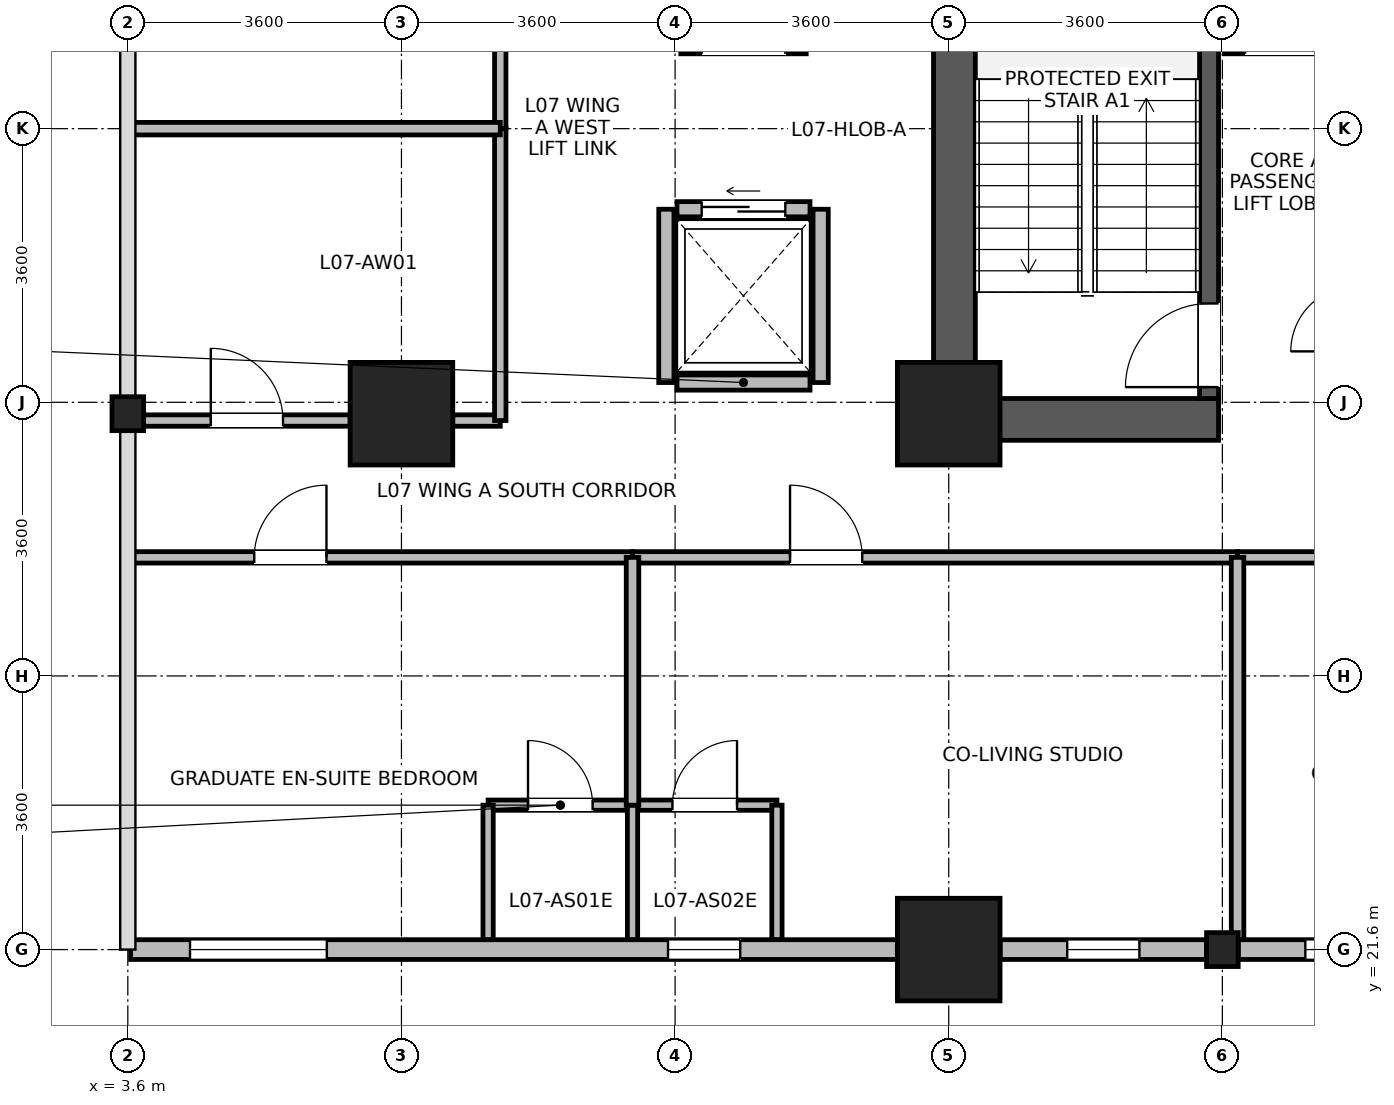
"""IFC4 building model, lengths in metres.
Left out: names, types, materials, properties, quantities, classifications, styles, units other than length and angle.
Written with IfcOpenShell. Run it as: python <this file> out.ifc"""

import sys

from ifc_helpers import new_model, si_unit, direction, frame, frame_2d, origin, origin_2d, place, context, subcontext, project, spatial, rectangle, i_section, extrude, source, transform, mapped, element, fill, save


model = new_model("IFC4")
c1 = context("Model", 3, precision=1e-05, world=origin(), true_north=direction((0.0, 1.0)))
c2 = subcontext(c1, "Body", "Model", "MODEL_VIEW")
j1 = project(units=[si_unit("LENGTHUNIT", "METRE"), si_unit("PLANEANGLEUNIT", "RADIAN")], contexts=[c1])
p1 = place(None, origin())
s1 = spatial("IfcSite", under=j1, at=p1, CompositionType="ELEMENT")
p2 = place(p1, origin())
s2 = spatial("IfcBuilding", under=s1, at=p2, CompositionType="ELEMENT")
p3 = place(p2, frame((0.0, 0.0, 32.7)))
s3 = spatial("IfcBuildingStorey", under=s2, at=p3, CompositionType="ELEMENT", Elevation=32.7)
p4 = place(p3, frame((14.475, 28.3, 0.0), z_axis=(0.0, 0.0, 1.0), x_axis=(0.0, 1.0, 0.0)))
e1 = element("IfcWall", 1, at=p4, inside=s3, PredefinedType="SHEAR", context=c2, shape_type="SweptSolid", body=[
    extrude(rectangle(XDim=8.1, YDim=0.55, at=frame_2d((4.05, 0.0))), origin(), (0.0, 0.0, 1.0), 3.45),
])
p5 = place(p3, frame((14.75, 28.575, 0.0), z_axis=(0.0, 0.0, 1.0), x_axis=(1.0, 0.0, 0.0)))
e2 = element("IfcWall", 2, at=p5, inside=s3, PredefinedType="SHEAR", context=c2, shape_type="SweptSolid", body=[
    extrude(rectangle(XDim=3.2, YDim=0.55, at=frame_2d((1.6, 0.0))), origin(), (0.0, 0.0, 1.0), 3.45),
])
p6 = place(p3, frame((17.825, 28.85, 0.0), z_axis=(0.0, 0.0, 1.0), x_axis=(0.0, 1.0, 0.0)))
e3 = element("IfcWall", 3, at=p6, inside=s3, PredefinedType="SHEAR", context=c2, shape_type="SweptSolid", body=[
    extrude(rectangle(XDim=7.0, YDim=0.25, at=frame_2d((3.5, 0.0))), origin(), (0.0, 0.0, 1.0), 3.45),
])
p7 = place(p6, frame((0.15, 0.0, 0.0)))
e4 = element("IfcOpeningElement", 4, at=p7, cuts=e3, PredefinedType="OPENING", context=c2, shape_type="SweptSolid", body=[
    extrude(rectangle(XDim=1.1, YDim=2.08, at=frame_2d((0.55, 1.04))), frame((0.0, 0.135, 0.0), z_axis=(0.0, -1.0, 0.0), x_axis=(1.0, 0.0, 0.0)), (0.0, 0.0, 1.0), 0.27),
])
m1 = source(origin(), c2, "Body", "SweptSolid", [
    extrude(rectangle(XDim=1.35, YDim=1.35, at=origin_2d()), origin(), (0.0, 0.0, 1.0), 3.7),
])
for number, where, z_axis, x_axis in (
    (5, (7.2, 28.65, 0.0), (0.0, 0.0, 1.0), (1.0, 0.0, 0.0)),
    (6, (14.4, 21.6, 0.0), (0.0, 0.0, 1.0), (1.0, 0.0, 0.0)),
    (7, (14.4, 28.65, 0.0), (0.0, 0.0, 1.0), (1.0, 0.0, 0.0)),
):
    element("IfcColumn", number, at=place(p3, frame(where, z_axis=z_axis, x_axis=x_axis)), inside=s3, PredefinedType="COLUMN", context=c2, shape_type="MappedRepresentation", body=[
        mapped(m1, transform((0.0, 0.0, 0.0), x_axis=(1.0, 0.0, 0.0), y_axis=(0.0, 1.0, 0.0), z_axis=(0.0, 0.0, 1.0), scale=1.0)),
    ])
m2 = source(origin(), c2, "Body", "SweptSolid", [
    extrude(i_section(OverallWidth=0.416, OverallDepth=0.446, WebThickness=0.029, FlangeThickness=0.04, FilletRadius=0.015, at=origin_2d()), origin(), (0.0, 0.0, 1.0), 3.7),
])
for number, where, z_axis, x_axis in (
    (8, (3.6, 28.65, 0.0), (0.0, 0.0, 1.0), (1.0, 0.0, 0.0)),
    (9, (18.0, 21.6, 0.0), (0.0, 0.0, 1.0), (1.0, 0.0, 0.0)),
):
    element("IfcColumn", number, at=place(p3, frame(where, z_axis=z_axis, x_axis=x_axis)), inside=s3, PredefinedType="COLUMN", context=c2, shape_type="MappedRepresentation", body=[
        mapped(m2, transform((0.0, 0.0, 0.0), x_axis=(1.0, 0.0, 0.0), y_axis=(0.0, 1.0, 0.0), z_axis=(0.0, 0.0, 1.0), scale=1.0)),
    ])
p8 = place(p3, frame((13.724, 21.6, 0.0), z_axis=(0.0, 0.0, 1.0), x_axis=(-1.0, 0.0, 0.0)))
e10 = element("IfcWall", 10, at=p8, inside=s3, PredefinedType="STANDARD", context=c2, shape_type="SweptSolid", body=[
    extrude(rectangle(XDim=10.087, YDim=0.26, at=frame_2d((5.043, 0.0))), origin(), (0.0, 0.0, 1.0), 3.43),
])
p9 = place(p8, frame((7.506, 0.0, 0.85)))
e11 = element("IfcOpeningElement", 11, at=p9, cuts=e10, PredefinedType="OPENING", context=c2, shape_type="SweptSolid", body=[
    extrude(rectangle(XDim=1.8, YDim=1.85, at=frame_2d((0.9, 0.925))), frame((0.0, 0.14, 0.0), z_axis=(0.0, -1.0, 0.0), x_axis=(1.0, 0.0, 0.0)), (0.0, 0.0, 1.0), 0.28),
])
p10 = place(p8, frame((2.067, 0.0, 0.85)))
e12 = element("IfcOpeningElement", 12, at=p10, cuts=e10, PredefinedType="OPENING", context=c2, shape_type="SweptSolid", body=[
    extrude(rectangle(XDim=0.95, YDim=1.75, at=frame_2d((0.475, 0.875))), frame((0.0, 0.14, 0.0), z_axis=(0.0, -1.0, 0.0), x_axis=(1.0, 0.0, 0.0)), (0.0, 0.0, 1.0), 0.28),
])
p11 = place(p3, frame((17.791, 21.6, 0.0), z_axis=(0.0, 0.0, 1.0), x_axis=(-1.0, 0.0, 0.0)))
e13 = element("IfcWall", 13, at=p11, inside=s3, PredefinedType="STANDARD", context=c2, shape_type="SweptSolid", body=[
    extrude(rectangle(XDim=2.715, YDim=0.26, at=frame_2d((1.357, 0.0))), origin(), (0.0, 0.0, 1.0), 2.93),
])
p12 = place(p11, frame((0.883, 0.0, 0.85)))
e14 = element("IfcOpeningElement", 14, at=p12, cuts=e13, PredefinedType="OPENING", context=c2, shape_type="SweptSolid", body=[
    extrude(rectangle(XDim=0.95, YDim=1.75, at=frame_2d((0.475, 0.875))), frame((0.0, 0.14, 0.0), z_axis=(0.0, -1.0, 0.0), x_axis=(1.0, 0.0, 0.0)), (0.0, 0.0, 1.0), 0.28),
])
p13 = place(p3, frame((20.924, 21.6, 0.0), z_axis=(0.0, 0.0, 1.0), x_axis=(-1.0, 0.0, 0.0)))
e15 = element("IfcWall", 15, at=p13, inside=s3, PredefinedType="STANDARD", context=c2, shape_type="SweptSolid", body=[
    extrude(rectangle(XDim=2.715, YDim=0.26, at=frame_2d((1.357, 0.0))), origin(), (0.0, 0.0, 1.0), 2.93),
])
p14 = place(p13, frame((0.883, 0.0, 0.85)))
e16 = element("IfcOpeningElement", 16, at=p14, cuts=e15, PredefinedType="OPENING", context=c2, shape_type="SweptSolid", body=[
    extrude(rectangle(XDim=0.95, YDim=1.75, at=frame_2d((0.475, 0.875))), frame((0.0, 0.14, 0.0), z_axis=(0.0, -1.0, 0.0), x_axis=(1.0, 0.0, 0.0)), (0.0, 0.0, 1.0), 0.28),
])
p15 = place(p3, frame((18.025, 33.485, 0.0), z_axis=(0.0, 0.0, 1.0), x_axis=(1.0, 0.0, 0.0)))
e17 = element("IfcWall", 17, at=p15, inside=s3, PredefinedType="PARTITIONING", context=c2, shape_type="SweptSolid", body=[
    extrude(rectangle(XDim=1.65, YDim=0.2, at=frame_2d((0.825, 0.0))), origin(), (0.0, 0.0, 1.0), 3.43),
])
p16 = place(p15, frame((0.275, 0.0, 0.0)))
e18 = element("IfcOpeningElement", 18, at=p16, cuts=e17, PredefinedType="OPENING", context=c2, shape_type="SweptSolid", body=[
    extrude(rectangle(XDim=1.1, YDim=2.12, at=frame_2d((0.55, 1.06))), frame((0.0, 0.11, 0.0), z_axis=(0.0, -1.0, 0.0), x_axis=(1.0, 0.0, 0.0)), (0.0, 0.0, 1.0), 0.22),
])
p17 = place(p3, frame((10.825, 29.06, 0.0), z_axis=(0.0, 0.0, 1.0), x_axis=(1.0, 0.0, 0.0)))
e19 = element("IfcWall", 19, at=p17, inside=s3, PredefinedType="PARTITIONING", context=c2, shape_type="SweptSolid", body=[
    extrude(rectangle(XDim=1.75, YDim=0.2, at=frame_2d((0.875, 0.0))), origin(), (0.0, 0.0, 1.0), 3.43),
])
p18 = place(p3, frame((10.825, 31.34, 0.0), z_axis=(0.0, 0.0, 1.0), x_axis=(1.0, 0.0, 0.0)))
e20 = element("IfcWall", 20, at=p18, inside=s3, PredefinedType="PARTITIONING", context=c2, shape_type="SweptSolid", body=[
    extrude(rectangle(XDim=1.75, YDim=0.2, at=frame_2d((0.875, 0.0))), origin(), (0.0, 0.0, 1.0), 3.43),
])
p19 = place(p18, frame((0.325, 0.0, 0.0)))
e21 = element("IfcOpeningElement", 21, at=p19, cuts=e20, PredefinedType="OPENING", context=c2, shape_type="SweptSolid", body=[
    extrude(rectangle(XDim=1.1, YDim=2.12, at=frame_2d((0.55, 1.06))), frame((0.0, 0.11, 0.0), z_axis=(0.0, -1.0, 0.0), x_axis=(1.0, 0.0, 0.0)), (0.0, 0.0, 1.0), 0.22),
])
for number, where, z_axis, x_axis in (
    (22, (10.685, 29.06, 0.0), (0.0, 0.0, 1.0), (0.0, 1.0, 0.0)),
    (23, (12.715, 29.06, 0.0), (0.0, 0.0, 1.0), (0.0, 1.0, 0.0)),
):
    element("IfcWall", number, at=place(p3, frame(where, z_axis=z_axis, x_axis=x_axis)), inside=s3, PredefinedType="PARTITIONING", context=c2, shape_type="SweptSolid", body=[
        extrude(rectangle(XDim=2.28, YDim=0.2, at=frame_2d((1.14, 0.0))), origin(), (0.0, 0.0, 1.0), 3.43),
    ])
p20 = place(p3, frame((10.875, 33.485, 0.0), z_axis=(0.0, 0.0, 1.0), x_axis=(1.0, 0.0, 0.0)))
e24 = element("IfcWall", 24, at=p20, inside=s3, PredefinedType="PARTITIONING", context=c2, shape_type="SweptSolid", body=[
    extrude(rectangle(XDim=1.65, YDim=0.2, at=frame_2d((0.825, 0.0))), origin(), (0.0, 0.0, 1.0), 3.43),
])
p21 = place(p20, frame((0.275, 0.0, 0.0)))
e25 = element("IfcOpeningElement", 25, at=p21, cuts=e24, PredefinedType="OPENING", context=c2, shape_type="SweptSolid", body=[
    extrude(rectangle(XDim=1.1, YDim=2.12, at=frame_2d((0.55, 1.06))), frame((0.0, 0.11, 0.0), z_axis=(0.0, -1.0, 0.0), x_axis=(1.0, 0.0, 0.0)), (0.0, 0.0, 1.0), 0.22),
])
p22 = place(p3, frame((8.34, 23.5, 0.0), z_axis=(0.0, 0.0, 1.0), x_axis=(1.0, 0.0, 0.0)))
e26 = element("IfcWall", 26, at=p22, inside=s3, PredefinedType="PARTITIONING", context=c2, shape_type="SweptSolid", body=[
    extrude(rectangle(XDim=1.9, YDim=0.135, at=frame_2d((0.95, 0.0))), origin(), (0.0, 0.0, 1.0), 3.43),
])
p23 = place(p22, frame((0.525, 0.0, 0.0)))
e27 = element("IfcOpeningElement", 27, at=p23, cuts=e26, PredefinedType="OPENING", context=c2, shape_type="SweptSolid", body=[
    extrude(rectangle(XDim=0.85, YDim=2.04, at=frame_2d((0.425, 1.02))), frame((0.0, 0.078, 0.0), z_axis=(0.0, -1.0, 0.0), x_axis=(1.0, 0.0, 0.0)), (0.0, 0.0, 1.0), 0.155),
])
p24 = place(p3, frame((10.24, 23.5, 0.0), z_axis=(0.0, 0.0, 1.0), x_axis=(1.0, 0.0, 0.0)))
e28 = element("IfcWall", 28, at=p24, inside=s3, PredefinedType="PARTITIONING", context=c2, shape_type="SweptSolid", body=[
    extrude(rectangle(XDim=1.9, YDim=0.135, at=frame_2d((0.95, 0.0))), origin(), (0.0, 0.0, 1.0), 3.43),
])
p25 = place(p24, frame((0.525, 0.0, 0.0)))
e29 = element("IfcOpeningElement", 29, at=p25, cuts=e28, PredefinedType="OPENING", context=c2, shape_type="SweptSolid", body=[
    extrude(rectangle(XDim=0.85, YDim=2.04, at=frame_2d((0.425, 1.02))), frame((0.0, 0.078, 0.0), z_axis=(0.0, -1.0, 0.0), x_axis=(1.0, 0.0, 0.0)), (0.0, 0.0, 1.0), 0.155),
])
for number, where, z_axis, x_axis in (
    (30, (8.34, 21.732, 0.0), (0.0, 0.0, 1.0), (0.0, 1.0, 0.0)),
    (31, (10.24, 21.732, 0.0), (0.0, 0.0, 1.0), (0.0, 1.0, 0.0)),
    (32, (12.14, 21.732, 0.0), (0.0, 0.0, 1.0), (0.0, 1.0, 0.0)),
):
    element("IfcWall", number, at=place(p3, frame(where, z_axis=z_axis, x_axis=x_axis)), inside=s3, PredefinedType="PARTITIONING", context=c2, shape_type="SweptSolid", body=[
        extrude(rectangle(XDim=1.768, YDim=0.135, at=frame_2d((0.884, 0.0))), origin(), (0.0, 0.0, 1.0), 3.43),
    ])
p26 = place(p3, frame((10.24, 26.76, 0.0), z_axis=(0.0, 0.0, 1.0), x_axis=(1.0, 0.0, 0.0)))
e33 = element("IfcWall", 33, at=p26, inside=s3, PredefinedType="PARTITIONING", context=c2, shape_type="SweptSolid", body=[
    extrude(rectangle(XDim=7.96, YDim=0.15, at=frame_2d((3.98, 0.0))), origin(), (0.0, 0.0, 1.0), 3.43),
])
p27 = place(p26, frame((2.072, 0.0, 0.0)))
e34 = element("IfcOpeningElement", 34, at=p27, cuts=e33, PredefinedType="OPENING", context=c2, shape_type="SweptSolid", body=[
    extrude(rectangle(XDim=0.95, YDim=2.1, at=frame_2d((0.475, 1.05))), frame((0.0, 0.085, 0.0), z_axis=(0.0, -1.0, 0.0), x_axis=(1.0, 0.0, 0.0)), (0.0, 0.0, 1.0), 0.17),
])
p28 = place(p3, frame((3.62, 26.76, 0.0), z_axis=(0.0, 0.0, 1.0), x_axis=(1.0, 0.0, 0.0)))
e35 = element("IfcWall", 35, at=p28, inside=s3, PredefinedType="PARTITIONING", context=c2, shape_type="SweptSolid", body=[
    extrude(rectangle(XDim=6.62, YDim=0.15, at=frame_2d((3.31, 0.0))), origin(), (0.0, 0.0, 1.0), 3.43),
])
p29 = place(p28, frame((1.643, 0.0, 0.0)))
e36 = element("IfcOpeningElement", 36, at=p29, cuts=e35, PredefinedType="OPENING", context=c2, shape_type="SweptSolid", body=[
    extrude(rectangle(XDim=0.95, YDim=2.1, at=frame_2d((0.475, 1.05))), frame((0.0, 0.085, 0.0), z_axis=(0.0, -1.0, 0.0), x_axis=(1.0, 0.0, 0.0)), (0.0, 0.0, 1.0), 0.17),
])
p30 = place(p3, frame((18.2, 26.76, 0.0), z_axis=(0.0, 0.0, 1.0), x_axis=(1.0, 0.0, 0.0)))
e37 = element("IfcWall", 37, at=p30, inside=s3, PredefinedType="PARTITIONING", context=c2, shape_type="SweptSolid", body=[
    extrude(rectangle(XDim=6.38, YDim=0.15, at=frame_2d((3.19, 0.0))), origin(), (0.0, 0.0, 1.0), 3.43),
])
p31 = place(p30, frame((2.54, 0.0, 0.0)))
e38 = element("IfcOpeningElement", 38, at=p31, cuts=e37, PredefinedType="OPENING", context=c2, shape_type="SweptSolid", body=[
    extrude(rectangle(XDim=1.3, YDim=2.12, at=frame_2d((0.65, 1.06))), frame((0.0, 0.085, 0.0), z_axis=(0.0, -1.0, 0.0), x_axis=(1.0, 0.0, 0.0)), (0.0, 0.0, 1.0), 0.17),
])
p32 = place(p3, frame((3.808, 28.56, 0.0), z_axis=(0.0, 0.0, 1.0), x_axis=(1.0, 0.0, 0.0)))
e39 = element("IfcWall", 39, at=p32, inside=s3, PredefinedType="PARTITIONING", context=c2, shape_type="SweptSolid", body=[
    extrude(rectangle(XDim=2.717, YDim=0.15, at=frame_2d((1.358, 0.0))), origin(), (0.0, 0.0, 1.0), 2.78),
])
p33 = place(p32, frame((0.884, 0.0, 0.0)))
e40 = element("IfcOpeningElement", 40, at=p33, cuts=e39, PredefinedType="OPENING", context=c2, shape_type="SweptSolid", body=[
    extrude(rectangle(XDim=0.95, YDim=2.1, at=frame_2d((0.475, 1.05))), frame((0.0, 0.085, 0.0), z_axis=(0.0, -1.0, 0.0), x_axis=(1.0, 0.0, 0.0)), (0.0, 0.0, 1.0), 0.17),
])
p34 = place(p3, frame((7.875, 28.56, 0.0), z_axis=(0.0, 0.0, 1.0), x_axis=(1.0, 0.0, 0.0)))
e41 = element("IfcWall", 41, at=p34, inside=s3, PredefinedType="PARTITIONING", context=c2, shape_type="SweptSolid", body=[
    extrude(rectangle(XDim=0.625, YDim=0.15, at=frame_2d((0.312, 0.0))), origin(), (0.0, 0.0, 1.0), 2.78),
])
p35 = place(p3, frame((8.5, 32.4, 0.0), z_axis=(0.0, 0.0, 1.0), x_axis=(0.0, 1.0, 0.0)))
e42 = element("IfcWall", 42, at=p35, inside=s3, PredefinedType="PARTITIONING", context=c2, shape_type="SweptSolid", body=[
    extrude(rectangle(XDim=3.84, YDim=0.15, at=frame_2d((1.92, 0.0))), origin(), (0.0, 0.0, 1.0), 3.43),
])
p36 = place(p3, frame((8.5, 28.56, 0.0), z_axis=(0.0, 0.0, 1.0), x_axis=(0.0, 1.0, 0.0)))
e43 = element("IfcWall", 43, at=p36, inside=s3, PredefinedType="PARTITIONING", context=c2, shape_type="SweptSolid", body=[
    extrude(rectangle(XDim=3.84, YDim=0.15, at=frame_2d((1.92, 0.0))), origin(), (0.0, 0.0, 1.0), 3.43),
])
p37 = place(p3, frame((18.2, 21.732, 0.0), z_axis=(0.0, 0.0, 1.0), x_axis=(0.0, 1.0, 0.0)))
e44 = element("IfcWall", 44, at=p37, inside=s3, PredefinedType="PARTITIONING", context=c2, shape_type="SweptSolid", body=[
    extrude(rectangle(XDim=5.028, YDim=0.165, at=frame_2d((2.514, 0.0))), origin(), (0.0, 0.0, 1.0), 3.07),
])
p38 = place(p3, frame((3.62, 32.4, 0.0), z_axis=(0.0, 0.0, 1.0), x_axis=(1.0, 0.0, 0.0)))
e45 = element("IfcWall", 45, at=p38, inside=s3, PredefinedType="PARTITIONING", context=c2, shape_type="SweptSolid", body=[
    extrude(rectangle(XDim=4.88, YDim=0.165, at=frame_2d((2.44, 0.0))), origin(), (0.0, 0.0, 1.0), 3.43),
])
p39 = place(p3, frame((10.24, 23.5, 0.0), z_axis=(0.0, 0.0, 1.0), x_axis=(0.0, 1.0, 0.0)))
e46 = element("IfcWall", 46, at=p39, inside=s3, PredefinedType="PARTITIONING", context=c2, shape_type="SweptSolid", body=[
    extrude(rectangle(XDim=3.26, YDim=0.165, at=frame_2d((1.63, 0.0))), origin(), (0.0, 0.0, 1.0), 3.43),
])
p40 = place(p9, origin())
e47 = element("IfcWindow", 47, at=p40, inside=s3, PartitioningType="SINGLE_PANEL", PredefinedType="WINDOW", context=c2, shape_type="SweptSolid", body=[
    extrude(rectangle(XDim=1.8, YDim=1.85, at=frame_2d((0.9, 0.925))), frame((0.0, 0.03, 0.0), z_axis=(0.0, -1.0, 0.0), x_axis=(1.0, 0.0, 0.0)), (0.0, 0.0, 1.0), 0.06),
])
fill(e11, e47)
p41 = place(p10, origin())
e48 = element("IfcWindow", 48, at=p41, inside=s3, PartitioningType="SINGLE_PANEL", PredefinedType="WINDOW", context=c2, shape_type="SweptSolid", body=[
    extrude(rectangle(XDim=0.95, YDim=1.75, at=frame_2d((0.475, 0.875))), frame((0.0, 0.03, 0.0), z_axis=(0.0, -1.0, 0.0), x_axis=(1.0, 0.0, 0.0)), (0.0, 0.0, 1.0), 0.06),
])
fill(e12, e48)
p42 = place(p12, origin())
e49 = element("IfcWindow", 49, at=p42, inside=s3, PartitioningType="SINGLE_PANEL", PredefinedType="WINDOW", context=c2, shape_type="SweptSolid", body=[
    extrude(rectangle(XDim=0.95, YDim=1.75, at=frame_2d((0.475, 0.875))), frame((0.0, 0.03, 0.0), z_axis=(0.0, -1.0, 0.0), x_axis=(1.0, 0.0, 0.0)), (0.0, 0.0, 1.0), 0.06),
])
fill(e14, e49)
p43 = place(p14, origin())
e50 = element("IfcWindow", 50, at=p43, inside=s3, PartitioningType="SINGLE_PANEL", PredefinedType="WINDOW", context=c2, shape_type="SweptSolid", body=[
    extrude(rectangle(XDim=0.95, YDim=1.75, at=frame_2d((0.475, 0.875))), frame((0.0, 0.03, 0.0), z_axis=(0.0, -1.0, 0.0), x_axis=(1.0, 0.0, 0.0)), (0.0, 0.0, 1.0), 0.06),
])
fill(e16, e50)
p44 = place(p7, origin())
e51 = element("IfcDoor", 51, at=p44, inside=s3, OperationType="SINGLE_SWING_LEFT", PredefinedType="DOOR", context=c2, shape_type="SweptSolid", body=[
    extrude(rectangle(XDim=1.1, YDim=2.08, at=frame_2d((0.55, 1.04))), frame((0.0, 0.025, 0.0), z_axis=(0.0, -1.0, 0.0), x_axis=(1.0, 0.0, 0.0)), (0.0, 0.0, 1.0), 0.05),
])
fill(e4, e51)
p45 = place(p19, origin())
e52 = element("IfcDoor", 52, at=p45, inside=s3, OperationType="SLIDING_TO_LEFT", PredefinedType="DOOR", context=c2, shape_type="SweptSolid", body=[
    extrude(rectangle(XDim=1.1, YDim=2.12, at=frame_2d((0.55, 1.06))), frame((0.0, 0.025, 0.0), z_axis=(0.0, -1.0, 0.0), x_axis=(1.0, 0.0, 0.0)), (0.0, 0.0, 1.0), 0.05),
])
fill(e21, e52)
p46 = place(p23, origin())
e53 = element("IfcDoor", 53, at=p46, inside=s3, OperationType="SINGLE_SWING_LEFT", PredefinedType="DOOR", context=c2, shape_type="SweptSolid", body=[
    extrude(rectangle(XDim=0.85, YDim=2.04, at=frame_2d((0.425, 1.02))), frame((0.0, 0.025, 0.0), z_axis=(0.0, -1.0, 0.0), x_axis=(1.0, 0.0, 0.0)), (0.0, 0.0, 1.0), 0.05),
])
fill(e27, e53)
p47 = place(p25, origin())
e54 = element("IfcDoor", 54, at=p47, inside=s3, OperationType="SINGLE_SWING_RIGHT", PredefinedType="DOOR", context=c2, shape_type="SweptSolid", body=[
    extrude(rectangle(XDim=0.85, YDim=2.04, at=frame_2d((0.425, 1.02))), frame((0.0, 0.025, 0.0), z_axis=(0.0, -1.0, 0.0), x_axis=(1.0, 0.0, 0.0)), (0.0, 0.0, 1.0), 0.05),
])
fill(e29, e54)
p48 = place(p27, origin())
e55 = element("IfcDoor", 55, at=p48, inside=s3, OperationType="SINGLE_SWING_LEFT", PredefinedType="DOOR", context=c2, shape_type="SweptSolid", body=[
    extrude(rectangle(XDim=0.95, YDim=2.1, at=frame_2d((0.475, 1.05))), frame((0.0, 0.025, 0.0), z_axis=(0.0, -1.0, 0.0), x_axis=(1.0, 0.0, 0.0)), (0.0, 0.0, 1.0), 0.05),
])
fill(e34, e55)
p49 = place(p29, origin())
e56 = element("IfcDoor", 56, at=p49, inside=s3, OperationType="SINGLE_SWING_RIGHT", PredefinedType="DOOR", context=c2, shape_type="SweptSolid", body=[
    extrude(rectangle(XDim=0.95, YDim=2.1, at=frame_2d((0.475, 1.05))), frame((0.0, 0.025, 0.0), z_axis=(0.0, -1.0, 0.0), x_axis=(1.0, 0.0, 0.0)), (0.0, 0.0, 1.0), 0.05),
])
fill(e36, e56)
p50 = place(p33, origin())
e57 = element("IfcDoor", 57, at=p50, inside=s3, OperationType="SINGLE_SWING_LEFT", PredefinedType="DOOR", context=c2, shape_type="SweptSolid", body=[
    extrude(rectangle(XDim=0.95, YDim=2.1, at=frame_2d((0.475, 1.05))), frame((0.0, 0.025, 0.0), z_axis=(0.0, -1.0, 0.0), x_axis=(1.0, 0.0, 0.0)), (0.0, 0.0, 1.0), 0.05),
])
fill(e40, e57)
save(model, sys.argv[1])
